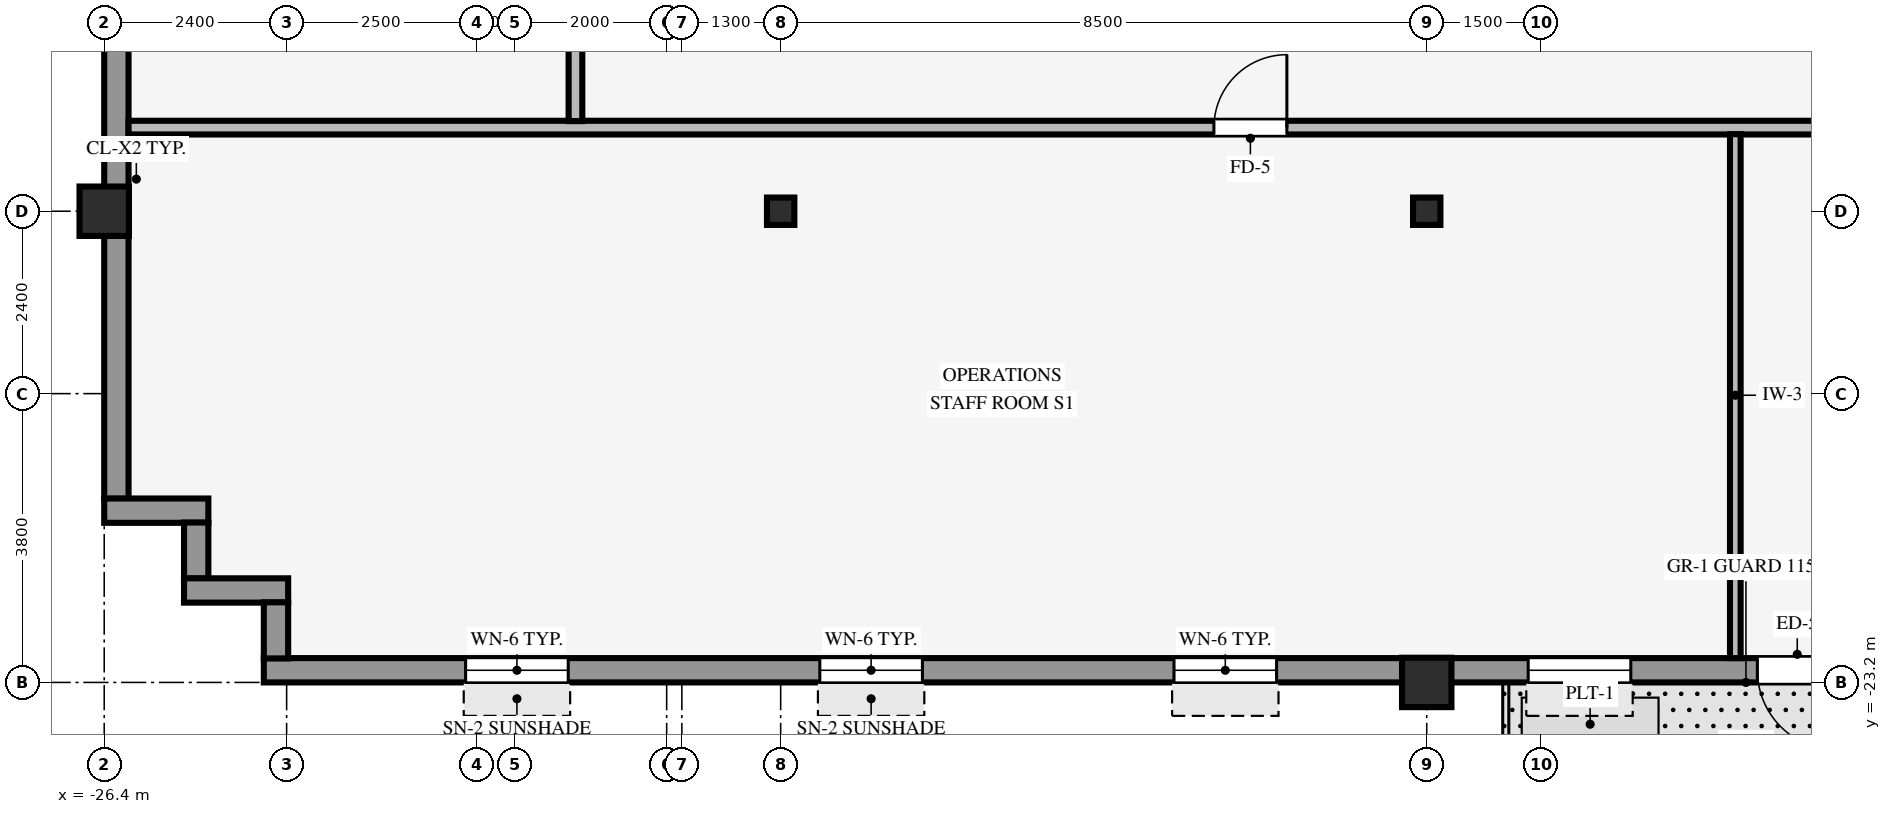
"""IFC4 building model, lengths in metres.
Left out: names, types, materials, properties, quantities, classifications, styles, units other than length and angle.
Written with IfcOpenShell. Run it as: python <this file> out.ifc"""

import sys

from ifc_helpers import new_model, si_unit, direction, frame, frame_2d, origin, origin_2d, place, context, subcontext, project, spatial, rectangle, hollow_rectangle, i_section, extrude, source, transform, mapped, element, fill, save


model = new_model("IFC4")
c1 = context("Model", 3, precision=1e-05, world=origin(), true_north=direction((0.0, 1.0)))
c2 = subcontext(c1, "Body", "Model", "MODEL_VIEW")
j1 = project(units=[si_unit("LENGTHUNIT", "METRE"), si_unit("PLANEANGLEUNIT", "RADIAN")], contexts=[c1])
p1 = place(None, origin())
s1 = spatial("IfcSite", under=j1, at=p1, CompositionType="ELEMENT")
p2 = place(p1, origin())
s2 = spatial("IfcBuilding", under=s1, at=p2, CompositionType="ELEMENT")
p3 = place(p2, frame((0.0, 0.0, 127.5)))
s3 = spatial("IfcBuildingStorey", under=s2, at=p3, CompositionType="ELEMENT", Elevation=127.5)
for number, where, z_axis, x_axis in (
    (1, (-26.4, -17.0, 0.0), (0.0, 0.0, 1.0), (1.0, 0.0, 0.0)),
    (2, (-9.0, -23.2, 0.0), (0.0, 0.0, 1.0), (1.0, 0.0, 0.0)),
):
    element("IfcColumn", number, at=place(p3, frame(where, z_axis=z_axis, x_axis=x_axis)), inside=s3, PredefinedType="COLUMN", context=c2, shape_type="SweptSolid", body=[
        extrude(hollow_rectangle(XDim=0.65, YDim=0.65, WallThickness=0.04, InnerFilletRadius=0.04, OuterFilletRadius=0.08, at=origin_2d()), origin(), (0.0, 0.0, 1.0), 3.37),
    ])
for number, where, z_axis, x_axis in (
    (3, (-17.5, -17.0, 0.0), (0.0, 0.0, 1.0), (1.0, 0.0, 0.0)),
    (4, (-9.0, -17.0, 0.0), (0.0, 0.0, 1.0), (1.0, 0.0, 0.0)),
):
    element("IfcColumn", number, at=place(p3, frame(where, z_axis=z_axis, x_axis=x_axis)), inside=s3, PredefinedType="COLUMN", context=c2, shape_type="SweptSolid", body=[
        extrude(i_section(OverallWidth=0.36, OverallDepth=0.36, WebThickness=0.021, FlangeThickness=0.021, FilletRadius=0.018, at=origin_2d()), origin(), (0.0, 0.0, 1.0), 3.37),
    ])
p4 = place(p3, frame((-24.3, -23.04, 0.0), z_axis=(0.0, 0.0, 1.0), x_axis=(1.0, 0.0, 0.0)))
e5 = element("IfcWall", 5, at=p4, inside=s3, PredefinedType="STANDARD", context=c2, shape_type="SweptSolid", body=[
    extrude(rectangle(XDim=48.6, YDim=0.32, at=frame_2d((24.3, 0.0))), origin(), (0.0, 0.0, 1.0), 2.705),
])
p5 = place(p4, frame((20.7, 0.0, 0.0), z_axis=(0.0, 0.0, 1.0), x_axis=(-1.0, 0.0, 0.0)))
e6 = element("IfcOpeningElement", 6, at=p5, cuts=e5, PredefinedType="OPENING", context=c2, shape_type="SweptSolid", body=[
    extrude(rectangle(XDim=1.05, YDim=2.1, at=frame_2d((0.525, 1.05))), frame((0.0, 0.17, 0.0), z_axis=(0.0, -1.0, 0.0), x_axis=(1.0, 0.0, 0.0)), (0.0, 0.0, 1.0), 0.34),
])
p6 = place(p4, frame((2.655, 0.0, 0.8)))
e7 = element("IfcOpeningElement", 7, at=p6, cuts=e5, PredefinedType="OPENING", context=c2, shape_type="SweptSolid", body=[
    extrude(rectangle(XDim=1.35, YDim=1.56, at=frame_2d((0.675, 0.78))), frame((0.0, 0.17, 0.0), z_axis=(0.0, -1.0, 0.0), x_axis=(1.0, 0.0, 0.0)), (0.0, 0.0, 1.0), 0.34),
])
p7 = place(p4, frame((7.315, 0.0, 0.8)))
e8 = element("IfcOpeningElement", 8, at=p7, cuts=e5, PredefinedType="OPENING", context=c2, shape_type="SweptSolid", body=[
    extrude(rectangle(XDim=1.35, YDim=1.56, at=frame_2d((0.675, 0.78))), frame((0.0, 0.17, 0.0), z_axis=(0.0, -1.0, 0.0), x_axis=(1.0, 0.0, 0.0)), (0.0, 0.0, 1.0), 0.34),
])
p8 = place(p4, frame((11.975, 0.0, 0.8)))
e9 = element("IfcOpeningElement", 9, at=p8, cuts=e5, PredefinedType="OPENING", context=c2, shape_type="SweptSolid", body=[
    extrude(rectangle(XDim=1.35, YDim=1.56, at=frame_2d((0.675, 0.78))), frame((0.0, 0.17, 0.0), z_axis=(0.0, -1.0, 0.0), x_axis=(1.0, 0.0, 0.0)), (0.0, 0.0, 1.0), 0.34),
])
p9 = place(p4, frame((16.635, 0.0, 0.8)))
e10 = element("IfcOpeningElement", 10, at=p9, cuts=e5, PredefinedType="OPENING", context=c2, shape_type="SweptSolid", body=[
    extrude(rectangle(XDim=1.35, YDim=1.56, at=frame_2d((0.675, 0.78))), frame((0.0, 0.17, 0.0), z_axis=(0.0, -1.0, 0.0), x_axis=(1.0, 0.0, 0.0)), (0.0, 0.0, 1.0), 0.34),
])
p10 = place(p4, frame((21.295, 0.0, 0.8)))
e11 = element("IfcOpeningElement", 11, at=p10, cuts=e5, PredefinedType="OPENING", context=c2, shape_type="SweptSolid", body=[
    extrude(rectangle(XDim=1.35, YDim=1.56, at=frame_2d((0.675, 0.78))), frame((0.0, 0.17, 0.0), z_axis=(0.0, -1.0, 0.0), x_axis=(1.0, 0.0, 0.0)), (0.0, 0.0, 1.0), 0.34),
])
p11 = place(p4, frame((25.955, 0.0, 0.8)))
e12 = element("IfcOpeningElement", 12, at=p11, cuts=e5, PredefinedType="OPENING", context=c2, shape_type="SweptSolid", body=[
    extrude(rectangle(XDim=1.35, YDim=1.56, at=frame_2d((0.675, 0.78))), frame((0.0, 0.17, 0.0), z_axis=(0.0, -1.0, 0.0), x_axis=(1.0, 0.0, 0.0)), (0.0, 0.0, 1.0), 0.34),
])
p12 = place(p4, frame((30.615, 0.0, 0.8)))
e13 = element("IfcOpeningElement", 13, at=p12, cuts=e5, PredefinedType="OPENING", context=c2, shape_type="SweptSolid", body=[
    extrude(rectangle(XDim=1.35, YDim=1.56, at=frame_2d((0.675, 0.78))), frame((0.0, 0.17, 0.0), z_axis=(0.0, -1.0, 0.0), x_axis=(1.0, 0.0, 0.0)), (0.0, 0.0, 1.0), 0.34),
])
p13 = place(p4, frame((35.275, 0.0, 0.8)))
e14 = element("IfcOpeningElement", 14, at=p13, cuts=e5, PredefinedType="OPENING", context=c2, shape_type="SweptSolid", body=[
    extrude(rectangle(XDim=1.35, YDim=1.56, at=frame_2d((0.675, 0.78))), frame((0.0, 0.17, 0.0), z_axis=(0.0, -1.0, 0.0), x_axis=(1.0, 0.0, 0.0)), (0.0, 0.0, 1.0), 0.34),
])
p14 = place(p4, frame((39.935, 0.0, 0.8)))
e15 = element("IfcOpeningElement", 15, at=p14, cuts=e5, PredefinedType="OPENING", context=c2, shape_type="SweptSolid", body=[
    extrude(rectangle(XDim=1.35, YDim=1.56, at=frame_2d((0.675, 0.78))), frame((0.0, 0.17, 0.0), z_axis=(0.0, -1.0, 0.0), x_axis=(1.0, 0.0, 0.0)), (0.0, 0.0, 1.0), 0.34),
])
p15 = place(p4, frame((44.595, 0.0, 0.8)))
e16 = element("IfcOpeningElement", 16, at=p15, cuts=e5, PredefinedType="OPENING", context=c2, shape_type="SweptSolid", body=[
    extrude(rectangle(XDim=1.35, YDim=1.56, at=frame_2d((0.675, 0.78))), frame((0.0, 0.17, 0.0), z_axis=(0.0, -1.0, 0.0), x_axis=(1.0, 0.0, 0.0)), (0.0, 0.0, 1.0), 0.34),
])
p16 = place(p3, frame((-26.24, -20.784, 0.0), z_axis=(0.0, 0.0, 1.0), x_axis=(0.0, 1.0, 0.0)))
e17 = element("IfcWall", 17, at=p16, inside=s3, PredefinedType="STANDARD", context=c2, shape_type="SweptSolid", body=[
    extrude(rectangle(XDim=41.568, YDim=0.32, at=frame_2d((20.784, 0.0))), origin(), (0.0, 0.0, 1.0), 2.705),
])
p17 = place(p16, frame((7.369, 0.0, 0.8)))
e18 = element("IfcOpeningElement", 18, at=p17, cuts=e17, PredefinedType="OPENING", context=c2, shape_type="SweptSolid", body=[
    extrude(rectangle(XDim=2.1, YDim=1.56, at=frame_2d((1.05, 0.78))), frame((0.0, 0.17, 0.0), z_axis=(0.0, -1.0, 0.0), x_axis=(1.0, 0.0, 0.0)), (0.0, 0.0, 1.0), 0.34),
])
p18 = place(p16, frame((12.315, 0.0, 0.8)))
e19 = element("IfcOpeningElement", 19, at=p18, cuts=e17, PredefinedType="OPENING", context=c2, shape_type="SweptSolid", body=[
    extrude(rectangle(XDim=2.1, YDim=1.56, at=frame_2d((1.05, 0.78))), frame((0.0, 0.17, 0.0), z_axis=(0.0, -1.0, 0.0), x_axis=(1.0, 0.0, 0.0)), (0.0, 0.0, 1.0), 0.34),
])
p19 = place(p16, frame((17.711, 0.0, 0.8)))
e20 = element("IfcOpeningElement", 20, at=p19, cuts=e17, PredefinedType="OPENING", context=c2, shape_type="SweptSolid", body=[
    extrude(rectangle(XDim=2.1, YDim=1.56, at=frame_2d((1.05, 0.78))), frame((0.0, 0.17, 0.0), z_axis=(0.0, -1.0, 0.0), x_axis=(1.0, 0.0, 0.0)), (0.0, 0.0, 1.0), 0.34),
])
p20 = place(p16, frame((22.207, 0.0, 0.8)))
e21 = element("IfcOpeningElement", 21, at=p20, cuts=e17, PredefinedType="OPENING", context=c2, shape_type="SweptSolid", body=[
    extrude(rectangle(XDim=2.1, YDim=1.56, at=frame_2d((1.05, 0.78))), frame((0.0, 0.17, 0.0), z_axis=(0.0, -1.0, 0.0), x_axis=(1.0, 0.0, 0.0)), (0.0, 0.0, 1.0), 0.34),
])
p21 = place(p16, frame((27.153, 0.0, 0.8)))
e22 = element("IfcOpeningElement", 22, at=p21, cuts=e17, PredefinedType="OPENING", context=c2, shape_type="SweptSolid", body=[
    extrude(rectangle(XDim=2.1, YDim=1.56, at=frame_2d((1.05, 0.78))), frame((0.0, 0.17, 0.0), z_axis=(0.0, -1.0, 0.0), x_axis=(1.0, 0.0, 0.0)), (0.0, 0.0, 1.0), 0.34),
])
p22 = place(p16, frame((32.099, 0.0, 0.8)))
e23 = element("IfcOpeningElement", 23, at=p22, cuts=e17, PredefinedType="OPENING", context=c2, shape_type="SweptSolid", body=[
    extrude(rectangle(XDim=2.1, YDim=1.56, at=frame_2d((1.05, 0.78))), frame((0.0, 0.17, 0.0), z_axis=(0.0, -1.0, 0.0), x_axis=(1.0, 0.0, 0.0)), (0.0, 0.0, 1.0), 0.34),
])
p23 = place(p3, frame((-26.4, -20.94, 0.0), z_axis=(0.0, 0.0, 1.0), x_axis=(1.0, 0.0, 0.0)))
e24 = element("IfcWall", 24, at=p23, inside=s3, PredefinedType="STANDARD", context=c2, shape_type="SweptSolid", body=[
    extrude(rectangle(XDim=1.37, YDim=0.32, at=frame_2d((0.685, 0.0))), origin(), (0.0, 0.0, 1.0), 3.36),
])
p24 = place(p3, frame((-25.19, -21.834, 0.0), z_axis=(0.0, 0.0, 1.0), x_axis=(0.0, 1.0, 0.0)))
e25 = element("IfcWall", 25, at=p24, inside=s3, PredefinedType="STANDARD", context=c2, shape_type="SweptSolid", body=[
    extrude(rectangle(XDim=0.738, YDim=0.32, at=frame_2d((0.369, 0.0))), origin(), (0.0, 0.0, 1.0), 3.36),
])
p25 = place(p3, frame((-25.35, -21.99, 0.0), z_axis=(0.0, 0.0, 1.0), x_axis=(1.0, 0.0, 0.0)))
e26 = element("IfcWall", 26, at=p25, inside=s3, PredefinedType="STANDARD", context=c2, shape_type="SweptSolid", body=[
    extrude(rectangle(XDim=1.37, YDim=0.32, at=frame_2d((0.685, 0.0))), origin(), (0.0, 0.0, 1.0), 3.36),
])
p26 = place(p3, frame((-24.14, -22.884, 0.0), z_axis=(0.0, 0.0, 1.0), x_axis=(0.0, 1.0, 0.0)))
e27 = element("IfcWall", 27, at=p26, inside=s3, PredefinedType="STANDARD", context=c2, shape_type="SweptSolid", body=[
    extrude(rectangle(XDim=0.738, YDim=0.32, at=frame_2d((0.369, 0.0))), origin(), (0.0, 0.0, 1.0), 3.36),
])
p27 = place(p3, frame((-26.08, -15.9, 0.0), z_axis=(0.0, 0.0, 1.0), x_axis=(1.0, 0.0, 0.0)))
e28 = element("IfcWall", 28, at=p27, inside=s3, PredefinedType="PARTITIONING", context=c2, shape_type="SweptSolid", body=[
    extrude(rectangle(XDim=52.16, YDim=0.18, at=frame_2d((26.08, 0.0))), origin(), (0.0, 0.0, 1.0), 3.36),
])
p28 = place(p27, frame((14.28, 0.0, 0.0)))
e29 = element("IfcOpeningElement", 29, at=p28, cuts=e28, PredefinedType="OPENING", context=c2, shape_type="SweptSolid", body=[
    extrude(rectangle(XDim=0.96, YDim=2.1, at=frame_2d((0.48, 1.05))), frame((0.0, 0.1, 0.0), z_axis=(0.0, -1.0, 0.0), x_axis=(1.0, 0.0, 0.0)), (0.0, 0.0, 1.0), 0.2),
])
p29 = place(p27, frame((40.5, 0.0, 0.0)))
e30 = element("IfcOpeningElement", 30, at=p29, cuts=e28, PredefinedType="OPENING", context=c2, shape_type="SweptSolid", body=[
    extrude(rectangle(XDim=0.96, YDim=2.1, at=frame_2d((0.48, 1.05))), frame((0.0, 0.1, 0.0), z_axis=(0.0, -1.0, 0.0), x_axis=(1.0, 0.0, 0.0)), (0.0, 0.0, 1.0), 0.2),
])
p30 = place(p3, frame((-20.2, -15.814, 0.0), z_axis=(0.0, 0.0, 1.0), x_axis=(0.0, 1.0, 0.0)))
e31 = element("IfcWall", 31, at=p30, inside=s3, PredefinedType="PARTITIONING", context=c2, shape_type="SweptSolid", body=[
    extrude(rectangle(XDim=31.628, YDim=0.18, at=frame_2d((15.814, 0.0))), origin(), (0.0, 0.0, 1.0), 3.36),
])
p31 = place(p30, frame((20.334, 0.0, 0.0)))
e32 = element("IfcOpeningElement", 32, at=p31, cuts=e31, PredefinedType="OPENING", context=c2, shape_type="SweptSolid", body=[
    extrude(rectangle(XDim=0.96, YDim=2.1, at=frame_2d((0.48, 1.05))), frame((0.0, 0.1, 0.0), z_axis=(0.0, -1.0, 0.0), x_axis=(1.0, 0.0, 0.0)), (0.0, 0.0, 1.0), 0.2),
])
p32 = place(p30, frame((6.834, 0.0, 0.0)))
e33 = element("IfcOpeningElement", 33, at=p32, cuts=e31, PredefinedType="OPENING", context=c2, shape_type="SweptSolid", body=[
    extrude(rectangle(XDim=0.96, YDim=2.1, at=frame_2d((0.48, 1.05))), frame((0.0, 0.1, 0.0), z_axis=(0.0, -1.0, 0.0), x_axis=(1.0, 0.0, 0.0)), (0.0, 0.0, 1.0), 0.2),
])
p33 = place(p3, frame((-4.94, -22.88, 0.0), z_axis=(0.0, 0.0, 1.0), x_axis=(0.0, 1.0, 0.0)))
e34 = element("IfcWall", 34, at=p33, inside=s3, PredefinedType="PARTITIONING", context=c2, shape_type="SweptSolid", body=[
    extrude(rectangle(XDim=6.894, YDim=0.14, at=frame_2d((3.447, 0.0))), origin(), (0.0, 0.0, 1.0), 3.36),
])
m1 = source(origin(), c2, "Body", "SweptSolid", [
    extrude(rectangle(XDim=1.05, YDim=2.1, at=frame_2d((0.525, 1.05))), frame((0.0, 0.025, 0.0), z_axis=(0.0, -1.0, 0.0), x_axis=(1.0, 0.0, 0.0)), (0.0, 0.0, 1.0), 0.05),
])
p34 = place(p5, origin())
e35 = element("IfcDoor", 35, at=p34, inside=s3, OperationType="SINGLE_SWING_LEFT", PredefinedType="DOOR", context=c2, shape_type="MappedRepresentation", body=[
    mapped(m1, transform((0.0, 0.0, 0.0), scale=1.0)),
])
fill(e6, e35)
m2 = source(origin(), c2, "Body", "SweptSolid", [
    extrude(rectangle(XDim=1.35, YDim=1.56, at=frame_2d((0.675, 0.78))), frame((0.0, 0.03, 0.0), z_axis=(0.0, -1.0, 0.0), x_axis=(1.0, 0.0, 0.0)), (0.0, 0.0, 1.0), 0.06),
])
p35 = place(p6, origin())
e36 = element("IfcWindow", 36, at=p35, inside=s3, PartitioningType="SINGLE_PANEL", PredefinedType="WINDOW", context=c2, shape_type="MappedRepresentation", body=[
    mapped(m2, transform((0.0, 0.0, 0.0), scale=1.0)),
])
fill(e7, e36)
p36 = place(p7, origin())
e37 = element("IfcWindow", 37, at=p36, inside=s3, PartitioningType="SINGLE_PANEL", PredefinedType="WINDOW", context=c2, shape_type="MappedRepresentation", body=[
    mapped(m2, transform((0.0, 0.0, 0.0), scale=1.0)),
])
fill(e8, e37)
p37 = place(p8, origin())
e38 = element("IfcWindow", 38, at=p37, inside=s3, PartitioningType="SINGLE_PANEL", PredefinedType="WINDOW", context=c2, shape_type="MappedRepresentation", body=[
    mapped(m2, transform((0.0, 0.0, 0.0), scale=1.0)),
])
fill(e9, e38)
p38 = place(p9, origin())
e39 = element("IfcWindow", 39, at=p38, inside=s3, PartitioningType="SINGLE_PANEL", PredefinedType="WINDOW", context=c2, shape_type="MappedRepresentation", body=[
    mapped(m2, transform((0.0, 0.0, 0.0), scale=1.0)),
])
fill(e10, e39)
m3 = source(origin(), c2, "Body", "SweptSolid", [
    extrude(rectangle(XDim=0.96, YDim=2.1, at=frame_2d((0.48, 1.05))), frame((0.0, 0.025, 0.0), z_axis=(0.0, -1.0, 0.0), x_axis=(1.0, 0.0, 0.0)), (0.0, 0.0, 1.0), 0.05),
])
p39 = place(p28, origin())
e40 = element("IfcDoor", 40, at=p39, inside=s3, OperationType="SINGLE_SWING_RIGHT", PredefinedType="DOOR", context=c2, shape_type="MappedRepresentation", body=[
    mapped(m3, transform((0.0, 0.0, 0.0), scale=1.0)),
])
fill(e29, e40)
save(model, sys.argv[1])
